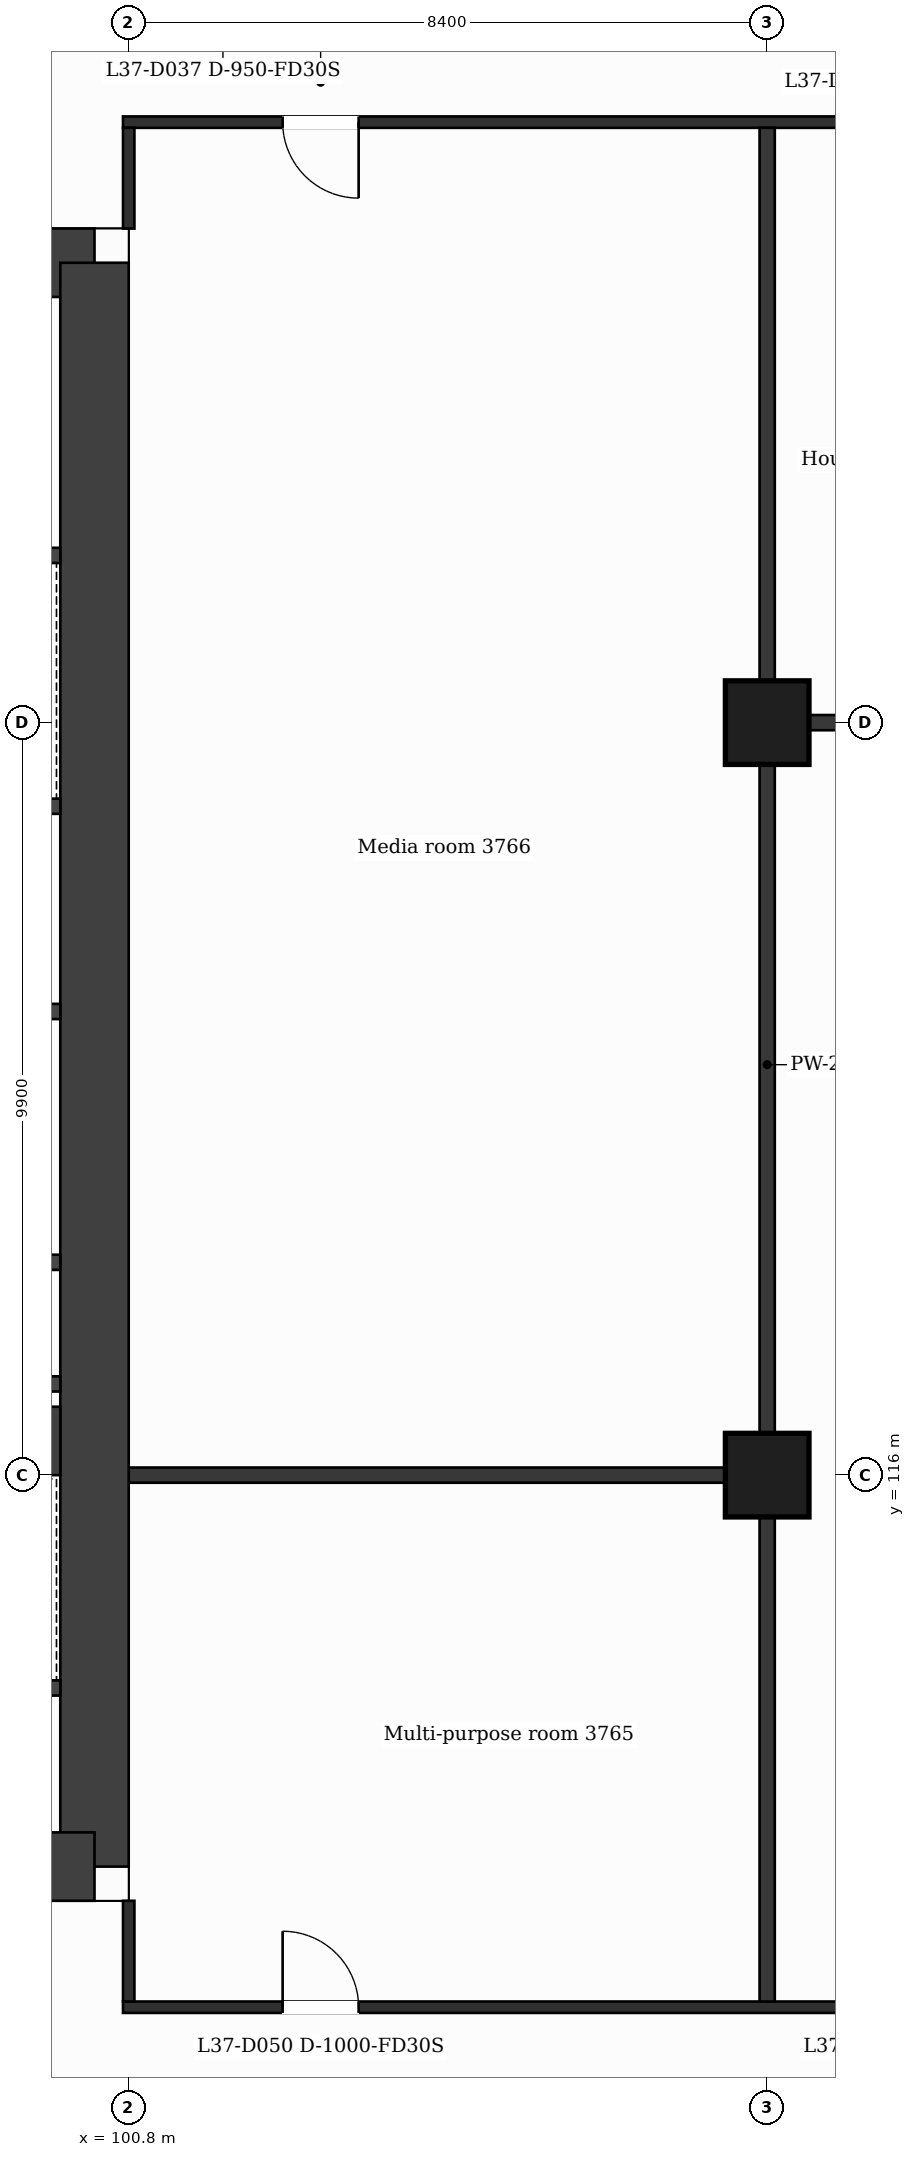
"""IFC4 building model, lengths in metres.
Left out: names, types, materials, properties, quantities, classifications, styles, units other than length and angle.
Written with IfcOpenShell. Run it as: python <this file> out.ifc"""

import sys

from ifc_helpers import new_model, si_unit, direction, frame, frame_2d, origin, origin_2d, place, context, subcontext, project, spatial, rectangle, extrude, element, fill, save


model = new_model("IFC4")
c1 = context("Model", 3, precision=1e-05, world=origin(), true_north=direction((0.0, 1.0)))
c2 = subcontext(c1, "Body", "Model", "MODEL_VIEW")
j1 = project(units=[si_unit("LENGTHUNIT", "METRE"), si_unit("PLANEANGLEUNIT", "RADIAN")], contexts=[c1])
p1 = place(None, origin())
s1 = spatial("IfcSite", under=j1, at=p1, CompositionType="ELEMENT")
p2 = place(p1, origin())
s2 = spatial("IfcBuilding", under=s1, at=p2, CompositionType="ELEMENT")
p3 = place(p2, frame((0.0, 0.0, 158.9)))
s3 = spatial("IfcBuildingStorey", under=s2, at=p3, CompositionType="ELEMENT", Elevation=158.9)
p4 = place(p3, frame((89.024, 131.95, 0.0), z_axis=(0.0, 0.0, 1.0), x_axis=(1.0, 0.0, 0.0)))
e1 = element("IfcWall", 1, at=p4, inside=s3, PredefinedType="SHEAR", context=c2, shape_type="SweptSolid", body=[
    extrude(rectangle(XDim=11.326, YDim=0.9, at=frame_2d((5.663, 0.0))), origin(), (0.0, 0.0, 1.0), 3.7),
])
p5 = place(p4, frame((6.739, 0.0, 0.0)))
e2 = element("IfcOpeningElement", 2, at=p5, cuts=e1, PredefinedType="OPENING", context=c2, shape_type="SweptSolid", body=[
    extrude(rectangle(XDim=1.2, YDim=2.1, at=frame_2d((0.6, 1.05))), frame((0.0, 0.46, 0.0), z_axis=(0.0, -1.0, 0.0), x_axis=(1.0, 0.0, 0.0)), (0.0, 0.0, 1.0), 0.92),
])
p6 = place(p3, frame((100.35, 131.95, 0.0), z_axis=(0.0, 0.0, 1.0), x_axis=(0.0, -1.0, 0.0)))
e3 = element("IfcWall", 3, at=p6, inside=s3, PredefinedType="SHEAR", context=c2, shape_type="SweptSolid", body=[
    extrude(rectangle(XDim=21.1, YDim=0.9, at=frame_2d((10.55, 0.0))), origin(), (0.0, 0.0, 1.0), 3.7),
])
p7 = place(p3, frame((100.35, 110.85, 0.0), z_axis=(0.0, 0.0, 1.0), x_axis=(-1.0, 0.0, 0.0)))
e4 = element("IfcWall", 4, at=p7, inside=s3, PredefinedType="SHEAR", context=c2, shape_type="SweptSolid", body=[
    extrude(rectangle(XDim=14.166, YDim=0.9, at=frame_2d((7.083, 0.0))), origin(), (0.0, 0.0, 1.0), 3.7),
])
p8 = place(p7, frame((5.855, 0.0, 0.0)))
e5 = element("IfcOpeningElement", 5, at=p8, cuts=e4, PredefinedType="OPENING", context=c2, shape_type="SweptSolid", body=[
    extrude(rectangle(XDim=1.4, YDim=2.1, at=frame_2d((0.7, 1.05))), frame((0.0, 0.46, 0.0), z_axis=(0.0, -1.0, 0.0), x_axis=(1.0, 0.0, 0.0)), (0.0, 0.0, 1.0), 0.92),
])
p9 = place(p3, frame((94.8, 116.45, 0.0), z_axis=(0.0, 0.0, 1.0), x_axis=(1.0, 0.0, 0.0)))
e6 = element("IfcWall", 6, at=p9, inside=s3, PredefinedType="SHEAR", context=c2, shape_type="SweptSolid", body=[
    extrude(rectangle(XDim=5.1, YDim=0.9, at=frame_2d((2.55, 0.0))), origin(), (0.0, 0.0, 1.0), 3.7),
])
for number, where, z_axis, x_axis in (
    (7, (109.2, 116.0, 0.0), (0.0, 0.0, 1.0), (1.0, 0.0, 0.0)),
    (8, (109.2, 125.9, 0.0), (0.0, 0.0, 1.0), (1.0, 0.0, 0.0)),
):
    element("IfcColumn", number, at=place(p3, frame(where, z_axis=z_axis, x_axis=x_axis)), inside=s3, PredefinedType="COLUMN", context=c2, shape_type="SweptSolid", body=[
        extrude(rectangle(XDim=1.1, YDim=1.1, at=origin_2d()), origin(), (0.0, 0.0, 1.0), 3.7),
    ])
p10 = place(p3, frame((100.725, 109.0, 0.0), z_axis=(0.0, 0.0, 1.0), x_axis=(1.0, 0.0, 0.0)))
e9 = element("IfcWall", 9, at=p10, inside=s3, PredefinedType="PARTITIONING", context=c2, shape_type="SweptSolid", body=[
    extrude(rectangle(XDim=25.35, YDim=0.15, at=frame_2d((12.675, 0.0))), origin(), (0.0, 0.0, 1.0), 3.38),
])
p11 = place(p10, frame((2.1, 0.0, 0.0)))
e10 = element("IfcOpeningElement", 10, at=p11, cuts=e9, PredefinedType="OPENING", context=c2, shape_type="SweptSolid", body=[
    extrude(rectangle(XDim=1.0, YDim=2.1, at=frame_2d((0.5, 1.05))), frame((0.0, 0.085, 0.0), z_axis=(0.0, -1.0, 0.0), x_axis=(1.0, 0.0, 0.0)), (0.0, 0.0, 1.0), 0.17),
])
p12 = place(p10, frame((10.075, 0.0, 0.0)))
e11 = element("IfcOpeningElement", 11, at=p12, cuts=e9, PredefinedType="OPENING", context=c2, shape_type="SweptSolid", body=[
    extrude(rectangle(XDim=1.0, YDim=2.1, at=frame_2d((0.5, 1.05))), frame((0.0, 0.085, 0.0), z_axis=(0.0, -1.0, 0.0), x_axis=(1.0, 0.0, 0.0)), (0.0, 0.0, 1.0), 0.17),
])
p13 = place(p10, frame((13.65, 0.0, 0.0)))
e12 = element("IfcOpeningElement", 12, at=p13, cuts=e9, PredefinedType="OPENING", context=c2, shape_type="SweptSolid", body=[
    extrude(rectangle(XDim=1.0, YDim=2.1, at=frame_2d((0.5, 1.05))), frame((0.0, 0.085, 0.0), z_axis=(0.0, -1.0, 0.0), x_axis=(1.0, 0.0, 0.0)), (0.0, 0.0, 1.0), 0.17),
])
p14 = place(p10, frame((18.475, 0.0, 0.0)))
e13 = element("IfcOpeningElement", 13, at=p14, cuts=e9, PredefinedType="OPENING", context=c2, shape_type="SweptSolid", body=[
    extrude(rectangle(XDim=1.0, YDim=2.1, at=frame_2d((0.5, 1.05))), frame((0.0, 0.085, 0.0), z_axis=(0.0, -1.0, 0.0), x_axis=(1.0, 0.0, 0.0)), (0.0, 0.0, 1.0), 0.17),
])
p15 = place(p10, frame((22.05, 0.0, 0.0)))
e14 = element("IfcOpeningElement", 14, at=p15, cuts=e9, PredefinedType="OPENING", context=c2, shape_type="SweptSolid", body=[
    extrude(rectangle(XDim=1.0, YDim=2.1, at=frame_2d((0.5, 1.05))), frame((0.0, 0.085, 0.0), z_axis=(0.0, -1.0, 0.0), x_axis=(1.0, 0.0, 0.0)), (0.0, 0.0, 1.0), 0.17),
])
p16 = place(p3, frame((95.127, 113.2, 0.0), z_axis=(0.0, 0.0, 1.0), x_axis=(1.0, 0.0, 0.0)))
e15 = element("IfcWall", 15, at=p16, inside=s3, PredefinedType="PARTITIONING", context=c2, shape_type="SweptSolid", body=[
    extrude(rectangle(XDim=4.773, YDim=0.2, at=frame_2d((2.386, 0.0))), origin(), (0.0, 0.0, 1.0), 3.38),
])
p17 = place(p16, frame((3.055, 0.0, 0.0)))
e16 = element("IfcOpeningElement", 16, at=p17, cuts=e15, PredefinedType="OPENING", context=c2, shape_type="SweptSolid", body=[
    extrude(rectangle(XDim=1.1, YDim=2.1, at=frame_2d((0.55, 1.05))), frame((0.0, 0.11, 0.0), z_axis=(0.0, -1.0, 0.0), x_axis=(1.0, 0.0, 0.0)), (0.0, 0.0, 1.0), 0.22),
])
p18 = place(p3, frame((100.8, 116.0, 0.0), z_axis=(0.0, 0.0, 1.0), x_axis=(1.0, 0.0, 0.0)))
e17 = element("IfcWall", 17, at=p18, inside=s3, PredefinedType="PARTITIONING", context=c2, shape_type="SweptSolid", body=[
    extrude(rectangle(XDim=8.4, YDim=0.2, at=frame_2d((4.2, 0.0))), origin(), (0.0, 0.0, 1.0), 3.38),
])
for number, where, z_axis, x_axis in (
    (18, (95.227, 117.2, 0.0), (0.0, 0.0, 1.0), (1.0, 0.0, 0.0)),
    (19, (95.227, 118.8, 0.0), (0.0, 0.0, 1.0), (1.0, 0.0, 0.0)),
):
    element("IfcWall", number, at=place(p3, frame(where, z_axis=z_axis, x_axis=x_axis)), inside=s3, PredefinedType="PARTITIONING", context=c2, shape_type="SweptSolid", body=[
        extrude(rectangle(XDim=4.673, YDim=0.2, at=frame_2d((2.336, 0.0))), origin(), (0.0, 0.0, 1.0), 3.38),
    ])
p19 = place(p3, frame((95.227, 122.1, 0.0), z_axis=(0.0, 0.0, 1.0), x_axis=(1.0, 0.0, 0.0)))
e20 = element("IfcWall", 20, at=p19, inside=s3, PredefinedType="PARTITIONING", context=c2, shape_type="SweptSolid", body=[
    extrude(rectangle(XDim=4.673, YDim=0.2, at=frame_2d((2.336, 0.0))), origin(), (0.0, 0.0, 1.0), 3.38),
])
p20 = place(p19, frame((0.718, 0.0, 0.0)))
e21 = element("IfcOpeningElement", 21, at=p20, cuts=e20, PredefinedType="OPENING", context=c2, shape_type="SweptSolid", body=[
    extrude(rectangle(XDim=0.9, YDim=2.1, at=frame_2d((0.45, 1.05))), frame((0.0, 0.11, 0.0), z_axis=(0.0, -1.0, 0.0), x_axis=(1.0, 0.0, 0.0)), (0.0, 0.0, 1.0), 0.22),
])
p21 = place(p19, frame((2.981, 0.0, 0.0)))
e22 = element("IfcOpeningElement", 22, at=p21, cuts=e20, PredefinedType="OPENING", context=c2, shape_type="SweptSolid", body=[
    extrude(rectangle(XDim=0.9, YDim=2.1, at=frame_2d((0.45, 1.05))), frame((0.0, 0.11, 0.0), z_axis=(0.0, -1.0, 0.0), x_axis=(1.0, 0.0, 0.0)), (0.0, 0.0, 1.0), 0.22),
])
p22 = place(p3, frame((92.702, 124.8, 0.0), z_axis=(0.0, 0.0, 1.0), x_axis=(1.0, 0.0, 0.0)))
e23 = element("IfcWall", 23, at=p22, inside=s3, PredefinedType="PARTITIONING", context=c2, shape_type="SweptSolid", body=[
    extrude(rectangle(XDim=7.198, YDim=0.2, at=frame_2d((3.599, 0.0))), origin(), (0.0, 0.0, 1.0), 3.38),
])
p23 = place(p22, frame((5.33, 0.0, 0.0)))
e24 = element("IfcOpeningElement", 24, at=p23, cuts=e23, PredefinedType="OPENING", context=c2, shape_type="SweptSolid", body=[
    extrude(rectangle(XDim=1.1, YDim=2.1, at=frame_2d((0.55, 1.05))), frame((0.0, 0.11, 0.0), z_axis=(0.0, -1.0, 0.0), x_axis=(1.0, 0.0, 0.0)), (0.0, 0.0, 1.0), 0.22),
])
p24 = place(p3, frame((109.2, 125.9, 0.0), z_axis=(0.0, 0.0, 1.0), x_axis=(1.0, 0.0, 0.0)))
e25 = element("IfcWall", 25, at=p24, inside=s3, PredefinedType="PARTITIONING", context=c2, shape_type="SweptSolid", body=[
    extrude(rectangle(XDim=4.2, YDim=0.2, at=frame_2d((2.1, 0.0))), origin(), (0.0, 0.0, 1.0), 3.38),
])
p25 = place(p3, frame((92.827, 128.1, 0.0), z_axis=(0.0, 0.0, 1.0), x_axis=(1.0, 0.0, 0.0)))
e26 = element("IfcWall", 26, at=p25, inside=s3, PredefinedType="PARTITIONING", context=c2, shape_type="SweptSolid", body=[
    extrude(rectangle(XDim=7.073, YDim=0.2, at=frame_2d((3.537, 0.0))), origin(), (0.0, 0.0, 1.0), 3.38),
])
p26 = place(p25, frame((2.987, 0.0, 0.0)))
e27 = element("IfcOpeningElement", 27, at=p26, cuts=e26, PredefinedType="OPENING", context=c2, shape_type="SweptSolid", body=[
    extrude(rectangle(XDim=1.1, YDim=2.1, at=frame_2d((0.55, 1.05))), frame((0.0, 0.11, 0.0), z_axis=(0.0, -1.0, 0.0), x_axis=(1.0, 0.0, 0.0)), (0.0, 0.0, 1.0), 0.22),
])
p27 = place(p3, frame((100.725, 133.8, 0.0), z_axis=(0.0, 0.0, 1.0), x_axis=(1.0, 0.0, 0.0)))
e28 = element("IfcWall", 28, at=p27, inside=s3, PredefinedType="PARTITIONING", context=c2, shape_type="SweptSolid", body=[
    extrude(rectangle(XDim=25.35, YDim=0.15, at=frame_2d((12.675, 0.0))), origin(), (0.0, 0.0, 1.0), 3.38),
])
p28 = place(p27, frame((2.1, 0.0, 0.0)))
e29 = element("IfcOpeningElement", 29, at=p28, cuts=e28, PredefinedType="OPENING", context=c2, shape_type="SweptSolid", body=[
    extrude(rectangle(XDim=1.0, YDim=2.1, at=frame_2d((0.5, 1.05))), frame((0.0, 0.085, 0.0), z_axis=(0.0, -1.0, 0.0), x_axis=(1.0, 0.0, 0.0)), (0.0, 0.0, 1.0), 0.17),
])
p29 = place(p27, frame((9.825, 0.0, 0.0)))
e30 = element("IfcOpeningElement", 30, at=p29, cuts=e28, PredefinedType="OPENING", context=c2, shape_type="SweptSolid", body=[
    extrude(rectangle(XDim=1.0, YDim=2.1, at=frame_2d((0.5, 1.05))), frame((0.0, 0.085, 0.0), z_axis=(0.0, -1.0, 0.0), x_axis=(1.0, 0.0, 0.0)), (0.0, 0.0, 1.0), 0.17),
])
p30 = place(p27, frame((14.525, 0.0, 0.0)))
e31 = element("IfcOpeningElement", 31, at=p30, cuts=e28, PredefinedType="OPENING", context=c2, shape_type="SweptSolid", body=[
    extrude(rectangle(XDim=1.0, YDim=2.1, at=frame_2d((0.5, 1.05))), frame((0.0, 0.085, 0.0), z_axis=(0.0, -1.0, 0.0), x_axis=(1.0, 0.0, 0.0)), (0.0, 0.0, 1.0), 0.17),
])
p31 = place(p3, frame((100.8, 109.075, 0.0), z_axis=(0.0, 0.0, 1.0), x_axis=(0.0, 1.0, 0.0)))
e32 = element("IfcWall", 32, at=p31, inside=s3, PredefinedType="PARTITIONING", context=c2, shape_type="SweptSolid", body=[
    extrude(rectangle(XDim=1.325, YDim=0.15, at=frame_2d((0.663, 0.0))), origin(), (0.0, 0.0, 1.0), 3.38),
])
p32 = place(p3, frame((100.8, 132.4, 0.0), z_axis=(0.0, 0.0, 1.0), x_axis=(0.0, 1.0, 0.0)))
e33 = element("IfcWall", 33, at=p32, inside=s3, PredefinedType="PARTITIONING", context=c2, shape_type="SweptSolid", body=[
    extrude(rectangle(XDim=1.325, YDim=0.15, at=frame_2d((0.663, 0.0))), origin(), (0.0, 0.0, 1.0), 3.38),
])
p33 = place(p3, frame((109.2, 109.075, 0.0), z_axis=(0.0, 0.0, 1.0), x_axis=(0.0, 1.0, 0.0)))
e34 = element("IfcWall", 34, at=p33, inside=s3, PredefinedType="PARTITIONING", context=c2, shape_type="SweptSolid", body=[
    extrude(rectangle(XDim=24.65, YDim=0.2, at=frame_2d((12.325, 0.0))), origin(), (0.0, 0.0, 1.0), 3.38),
])
p34 = place(p11, origin())
e35 = element("IfcDoor", 35, at=p34, inside=s3, OperationType="SINGLE_SWING_LEFT", PredefinedType="DOOR", context=c2, shape_type="SweptSolid", body=[
    extrude(rectangle(XDim=1.0, YDim=2.1, at=frame_2d((0.5, 1.05))), frame((0.0, 0.025, 0.0), z_axis=(0.0, -1.0, 0.0), x_axis=(1.0, 0.0, 0.0)), (0.0, 0.0, 1.0), 0.05),
])
fill(e10, e35)
p35 = place(p28, origin())
e36 = element("IfcDoor", 36, at=p35, inside=s3, OperationType="SINGLE_SWING_RIGHT", PredefinedType="DOOR", context=c2, shape_type="SweptSolid", body=[
    extrude(rectangle(XDim=1.0, YDim=2.1, at=frame_2d((0.5, 1.05))), frame((0.0, 0.025, 0.0), z_axis=(0.0, -1.0, 0.0), x_axis=(1.0, 0.0, 0.0)), (0.0, 0.0, 1.0), 0.05),
])
fill(e29, e36)
save(model, sys.argv[1])
